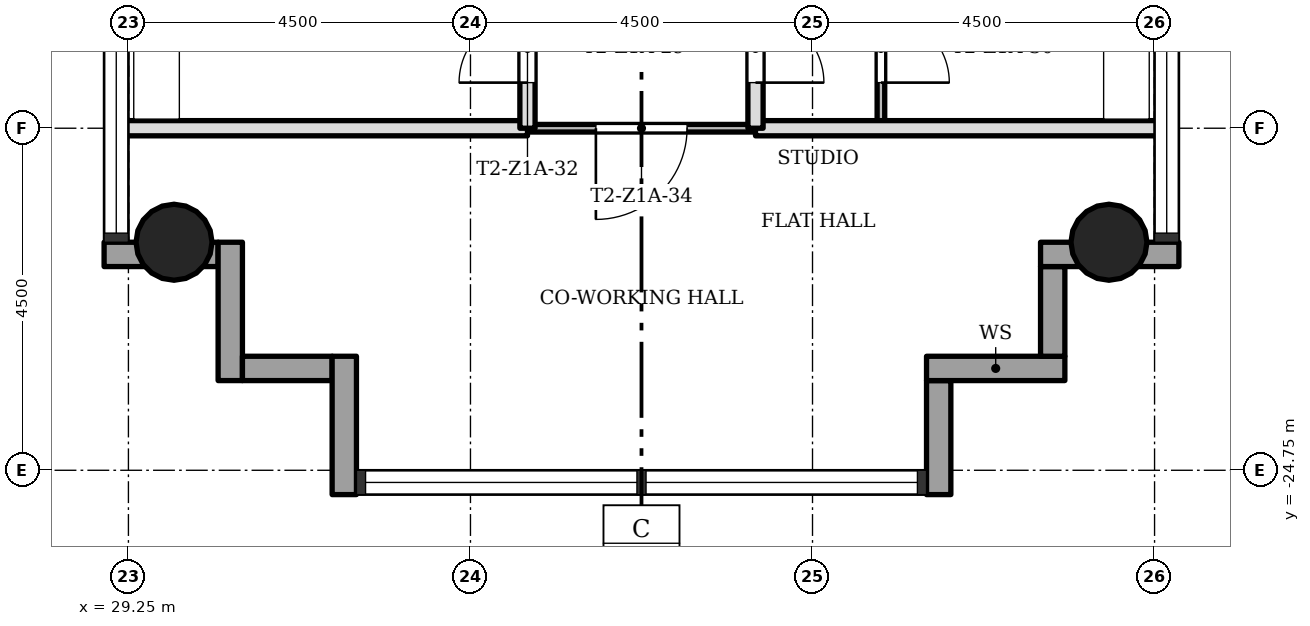
"""IFC4 building model, lengths in metres.
Left out: names, types, materials, properties, quantities, classifications, styles, units other than length and angle.
Written with IfcOpenShell. Run it as: python <this file> out.ifc"""

import sys

from ifc_helpers import new_model, si_unit, direction, frame, frame_2d, origin, origin_2d, place, context, subcontext, project, spatial, rectangle, hollow_circle, extrude, element, fill, save


model = new_model("IFC4")
c1 = context("Model", 3, precision=1e-05, world=origin(), true_north=direction((0.0, 1.0)))
c2 = subcontext(c1, "Body", "Model", "MODEL_VIEW")
j1 = project(units=[si_unit("LENGTHUNIT", "METRE"), si_unit("PLANEANGLEUNIT", "RADIAN")], contexts=[c1])
p1 = place(None, origin())
s1 = spatial("IfcSite", under=j1, at=p1, CompositionType="ELEMENT")
p2 = place(p1, origin())
s2 = spatial("IfcBuilding", under=s1, at=p2, CompositionType="ELEMENT")
p3 = place(p2, frame((0.0, 0.0, 27.9)))
s3 = spatial("IfcBuildingStorey", under=s2, at=p3, CompositionType="ELEMENT", Elevation=27.9)
for number, where, z_axis, x_axis in (
    (1, (42.15, -21.75, 0.0), (0.0, 0.0, 1.0), (1.0, 0.0, 0.0)),
    (2, (29.85, -21.75, 0.0), (0.0, 0.0, 1.0), (1.0, 0.0, 0.0)),
):
    element("IfcColumn", number, at=place(p3, frame(where, z_axis=z_axis, x_axis=x_axis)), inside=s3, PredefinedType="COLUMN", context=c2, shape_type="SweptSolid", body=[
        extrude(hollow_circle(Radius=0.5, WallThickness=0.036, at=origin_2d()), origin(), (0.0, 0.0, 1.0), 3.4),
    ])
p4 = place(p3, frame((39.91, -25.07, -0.3), z_axis=(0.0, 0.0, 1.0), x_axis=(0.0, 1.0, 0.0)))
e3 = element("IfcWall", 3, at=p4, inside=s3, PredefinedType="STANDARD", context=c2, shape_type="SweptSolid", body=[
    extrude(rectangle(XDim=1.5, YDim=0.32, at=frame_2d((0.75, 0.0))), origin(), (0.0, 0.0, 1.0), 3.4),
])
p5 = place(p3, frame((39.75, -23.41, -0.3), z_axis=(0.0, 0.0, 1.0), x_axis=(1.0, 0.0, 0.0)))
e4 = element("IfcWall", 4, at=p5, inside=s3, PredefinedType="STANDARD", context=c2, shape_type="SweptSolid", body=[
    extrude(rectangle(XDim=1.82, YDim=0.32, at=frame_2d((0.91, 0.0))), origin(), (0.0, 0.0, 1.0), 3.4),
])
p6 = place(p3, frame((41.41, -23.25, -0.3), z_axis=(0.0, 0.0, 1.0), x_axis=(0.0, 1.0, 0.0)))
e5 = element("IfcWall", 5, at=p6, inside=s3, PredefinedType="STANDARD", context=c2, shape_type="SweptSolid", body=[
    extrude(rectangle(XDim=1.18, YDim=0.32, at=frame_2d((0.59, 0.0))), origin(), (0.0, 0.0, 1.0), 3.4),
])
p7 = place(p3, frame((41.25, -21.91, -0.3), z_axis=(0.0, 0.0, 1.0), x_axis=(1.0, 0.0, 0.0)))
e6 = element("IfcWall", 6, at=p7, inside=s3, PredefinedType="STANDARD", context=c2, shape_type="SweptSolid", body=[
    extrude(rectangle(XDim=1.82, YDim=0.32, at=frame_2d((0.91, 0.0))), origin(), (0.0, 0.0, 1.0), 3.4),
])
p8 = place(p3, frame((28.93, -21.91, -0.3), z_axis=(0.0, 0.0, 1.0), x_axis=(1.0, 0.0, 0.0)))
e7 = element("IfcWall", 7, at=p8, inside=s3, PredefinedType="STANDARD", context=c2, shape_type="SweptSolid", body=[
    extrude(rectangle(XDim=1.5, YDim=0.32, at=frame_2d((0.75, 0.0))), origin(), (0.0, 0.0, 1.0), 3.4),
])
p9 = place(p3, frame((30.59, -21.75, -0.3), z_axis=(0.0, 0.0, 1.0), x_axis=(0.0, -1.0, 0.0)))
e8 = element("IfcWall", 8, at=p9, inside=s3, PredefinedType="STANDARD", context=c2, shape_type="SweptSolid", body=[
    extrude(rectangle(XDim=1.82, YDim=0.32, at=frame_2d((0.91, 0.0))), origin(), (0.0, 0.0, 1.0), 3.4),
])
p10 = place(p3, frame((30.75, -23.41, -0.3), z_axis=(0.0, 0.0, 1.0), x_axis=(1.0, 0.0, 0.0)))
e9 = element("IfcWall", 9, at=p10, inside=s3, PredefinedType="STANDARD", context=c2, shape_type="SweptSolid", body=[
    extrude(rectangle(XDim=1.18, YDim=0.32, at=frame_2d((0.59, 0.0))), origin(), (0.0, 0.0, 1.0), 3.4),
])
p11 = place(p3, frame((32.09, -23.25, -0.3), z_axis=(0.0, 0.0, 1.0), x_axis=(0.0, -1.0, 0.0)))
e10 = element("IfcWall", 10, at=p11, inside=s3, PredefinedType="STANDARD", context=c2, shape_type="SweptSolid", body=[
    extrude(rectangle(XDim=1.82, YDim=0.32, at=frame_2d((0.91, 0.0))), origin(), (0.0, 0.0, 1.0), 3.4),
])
p12 = place(p3, frame((37.5, -20.25, 0.0), z_axis=(0.0, 0.0, 1.0), x_axis=(-1.0, 0.0, 0.0)))
e11 = element("IfcWall", 11, at=p12, inside=s3, PredefinedType="PARTITIONING", context=c2, shape_type="SweptSolid", body=[
    extrude(rectangle(XDim=3.0, YDim=0.1, at=frame_2d((1.5, 0.0))), origin(), (0.0, 0.0, 1.0), 3.0),
])
p13 = place(p12, frame((0.9, 0.0, 0.0)))
e12 = element("IfcOpeningElement", 12, at=p13, cuts=e11, PredefinedType="OPENING", context=c2, shape_type="SweptSolid", body=[
    extrude(rectangle(XDim=1.2, YDim=2.1, at=frame_2d((0.6, 1.05))), frame((0.0, 0.06, 0.0), z_axis=(0.0, -1.0, 0.0), x_axis=(1.0, 0.0, 0.0)), (0.0, 0.0, 1.0), 0.12),
])
for number, where, z_axis, x_axis in (
    (13, (42.85, -20.25, 0.0), (0.0, 0.0, 1.0), (-1.0, 0.0, 0.0)),
    (14, (34.5, -20.25, 0.0), (0.0, 0.0, 1.0), (-1.0, 0.0, 0.0)),
):
    element("IfcWall", number, at=place(p3, frame(where, z_axis=z_axis, x_axis=x_axis)), inside=s3, PredefinedType="SOLIDWALL", context=c2, shape_type="SweptSolid", body=[
        extrude(rectangle(XDim=5.35, YDim=0.2, at=frame_2d((2.675, 0.0))), origin(), (0.0, 0.0, 1.0), 3.0),
    ])
p14 = place(p3, frame((39.15, -20.25, 0.0), z_axis=(0.0, 0.0, 1.0), x_axis=(0.0, 1.0, 0.0)))
e15 = element("IfcWall", 15, at=p14, inside=s3, PredefinedType="PARTITIONING", context=c2, shape_type="SweptSolid", body=[
    extrude(rectangle(XDim=4.5, YDim=0.1, at=frame_2d((2.25, 0.0))), origin(), (0.0, 0.0, 1.0), 3.0),
])
p15 = place(p14, frame((0.6, 0.0, 0.0)))
e16 = element("IfcOpeningElement", 16, at=p15, cuts=e15, PredefinedType="OPENING", context=c2, shape_type="SweptSolid", body=[
    extrude(rectangle(XDim=0.9, YDim=2.1, at=frame_2d((0.45, 1.05))), frame((0.0, 0.06, 0.0), z_axis=(0.0, -1.0, 0.0), x_axis=(1.0, 0.0, 0.0)), (0.0, 0.0, 1.0), 0.12),
])
p16 = place(p3, frame((37.5, -20.25, 0.0), z_axis=(0.0, 0.0, 1.0), x_axis=(0.0, 1.0, 0.0)))
e17 = element("IfcWall", 17, at=p16, inside=s3, PredefinedType="SOLIDWALL", context=c2, shape_type="SweptSolid", body=[
    extrude(rectangle(XDim=4.5, YDim=0.2, at=frame_2d((2.25, 0.0))), origin(), (0.0, 0.0, 1.0), 3.0),
])
p17 = place(p16, frame((0.6, 0.0, 0.0)))
e18 = element("IfcOpeningElement", 18, at=p17, cuts=e17, PredefinedType="OPENING", context=c2, shape_type="SweptSolid", body=[
    extrude(rectangle(XDim=0.9, YDim=2.1, at=frame_2d((0.45, 1.05))), frame((0.0, 0.11, 0.0), z_axis=(0.0, -1.0, 0.0), x_axis=(1.0, 0.0, 0.0)), (0.0, 0.0, 1.0), 0.22),
])
p18 = place(p3, frame((34.5, -20.25, 0.0), z_axis=(0.0, 0.0, 1.0), x_axis=(0.0, 1.0, 0.0)))
e19 = element("IfcWall", 19, at=p18, inside=s3, PredefinedType="SOLIDWALL", context=c2, shape_type="SweptSolid", body=[
    extrude(rectangle(XDim=4.5, YDim=0.2, at=frame_2d((2.25, 0.0))), origin(), (0.0, 0.0, 1.0), 3.0),
])
p19 = place(p18, frame((0.6, 0.0, 0.0)))
e20 = element("IfcOpeningElement", 20, at=p19, cuts=e19, PredefinedType="OPENING", context=c2, shape_type="SweptSolid", body=[
    extrude(rectangle(XDim=0.9, YDim=2.1, at=frame_2d((0.45, 1.05))), frame((0.0, 0.11, 0.0), z_axis=(0.0, -1.0, 0.0), x_axis=(1.0, 0.0, 0.0)), (0.0, 0.0, 1.0), 0.22),
])
p20 = place(p17, origin())
e21 = element("IfcDoor", 21, at=p20, inside=s3, OperationType="SINGLE_SWING_LEFT", PredefinedType="DOOR", context=c2, shape_type="SweptSolid", body=[
    extrude(rectangle(XDim=0.9, YDim=2.1, at=frame_2d((0.45, 1.05))), frame((0.0, 0.025, 0.0), z_axis=(0.0, -1.0, 0.0), x_axis=(1.0, 0.0, 0.0)), (0.0, 0.0, 1.0), 0.05),
])
fill(e18, e21)
p21 = place(p15, origin())
e22 = element("IfcDoor", 22, at=p21, inside=s3, OperationType="SINGLE_SWING_LEFT", PredefinedType="DOOR", context=c2, shape_type="SweptSolid", body=[
    extrude(rectangle(XDim=0.9, YDim=2.1, at=frame_2d((0.45, 1.05))), frame((0.0, 0.025, 0.0), z_axis=(0.0, -1.0, 0.0), x_axis=(1.0, 0.0, 0.0)), (0.0, 0.0, 1.0), 0.05),
])
fill(e16, e22)
p22 = place(p19, origin())
e23 = element("IfcDoor", 23, at=p22, inside=s3, OperationType="SINGLE_SWING_RIGHT", PredefinedType="DOOR", context=c2, shape_type="SweptSolid", body=[
    extrude(rectangle(XDim=0.9, YDim=2.1, at=frame_2d((0.45, 1.05))), frame((0.0, 0.025, 0.0), z_axis=(0.0, -1.0, 0.0), x_axis=(1.0, 0.0, 0.0)), (0.0, 0.0, 1.0), 0.05),
])
fill(e20, e23)
p23 = place(p13, origin())
e24 = element("IfcDoor", 24, at=p23, inside=s3, OperationType="SINGLE_SWING_LEFT", PredefinedType="DOOR", context=c2, shape_type="SweptSolid", body=[
    extrude(rectangle(XDim=1.2, YDim=2.1, at=frame_2d((0.6, 1.05))), frame((0.0, 0.025, 0.0), z_axis=(0.0, -1.0, 0.0), x_axis=(1.0, 0.0, 0.0)), (0.0, 0.0, 1.0), 0.05),
])
fill(e12, e24)
save(model, sys.argv[1])
